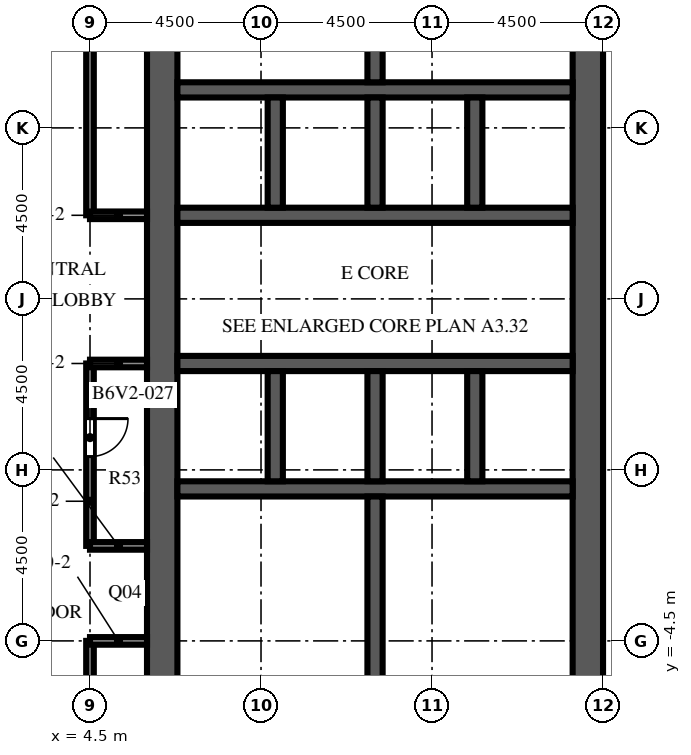
"""IFC4 building model, lengths in metres.
Left out: names, types, materials, properties, quantities, classifications, styles, units other than length and angle.
Written with IfcOpenShell. Run it as: python <this file> out.ifc"""

import sys

from ifc_helpers import new_model, si_unit, direction, frame, frame_2d, origin, place, context, subcontext, project, spatial, rectangle, extrude, element, fill, save


model = new_model("IFC4")
c1 = context("Model", 3, precision=1e-05, world=origin(), true_north=direction((0.0, 1.0)))
c2 = subcontext(c1, "Body", "Model", "MODEL_VIEW")
j1 = project(units=[si_unit("LENGTHUNIT", "METRE"), si_unit("PLANEANGLEUNIT", "RADIAN")], contexts=[c1])
p1 = place(None, origin())
s1 = spatial("IfcSite", under=j1, at=p1, CompositionType="ELEMENT")
p2 = place(p1, origin())
s2 = spatial("IfcBuilding", under=s1, at=p2, CompositionType="ELEMENT")
p3 = place(p2, frame((0.0, 0.0, 216.1)))
s3 = spatial("IfcBuildingStorey", under=s2, at=p3, CompositionType="ELEMENT", Elevation=216.1)
p4 = place(p3, frame((6.4, -9.0, 0.0), z_axis=(0.0, 0.0, 1.0), x_axis=(0.0, 1.0, 0.0)))
e1 = element("IfcWall", 1, at=p4, inside=s3, PredefinedType="SHEAR", context=c2, shape_type="SweptSolid", body=[
    extrude(rectangle(XDim=27.5, YDim=0.8, at=frame_2d((13.75, 0.0))), origin(), (0.0, 0.0, 1.0), 4.1),
])
p5 = place(p4, frame((12.55, 0.0, 0.0)))
e2 = element("IfcOpeningElement", 2, at=p5, cuts=e1, PredefinedType="OPENING", context=c2, shape_type="SweptSolid", body=[
    extrude(rectangle(XDim=2.4, YDim=2.4, at=frame_2d((1.2, 1.2))), frame((0.0, 0.41, 0.0), z_axis=(0.0, -1.0, 0.0), x_axis=(1.0, 0.0, 0.0)), (0.0, 0.0, 1.0), 0.82),
])
p6 = place(p4, frame((5.5, 0.0, 0.0)))
e3 = element("IfcOpeningElement", 3, at=p6, cuts=e1, PredefinedType="OPENING", context=c2, shape_type="SweptSolid", body=[
    extrude(rectangle(XDim=0.95, YDim=2.1, at=frame_2d((0.475, 1.05))), frame((0.0, 0.41, 0.0), z_axis=(0.0, -1.0, 0.0), x_axis=(1.0, 0.0, 0.0)), (0.0, 0.0, 1.0), 0.82),
])
p7 = place(p4, frame((23.475, 0.0, 0.0)))
e4 = element("IfcOpeningElement", 4, at=p7, cuts=e1, PredefinedType="OPENING", context=c2, shape_type="SweptSolid", body=[
    extrude(rectangle(XDim=1.2, YDim=2.1, at=frame_2d((0.6, 1.05))), frame((0.0, 0.41, 0.0), z_axis=(0.0, -1.0, 0.0), x_axis=(1.0, 0.0, 0.0)), (0.0, 0.0, 1.0), 0.82),
])
p8 = place(p3, frame((17.6, -9.0, 0.0), z_axis=(0.0, 0.0, 1.0), x_axis=(0.0, 1.0, 0.0)))
e5 = element("IfcWall", 5, at=p8, inside=s3, PredefinedType="SHEAR", context=c2, shape_type="SweptSolid", body=[
    extrude(rectangle(XDim=27.5, YDim=0.8, at=frame_2d((13.75, 0.0))), origin(), (0.0, 0.0, 1.0), 4.1),
])
p9 = place(p8, frame((12.55, 0.0, 0.0)))
e6 = element("IfcOpeningElement", 6, at=p9, cuts=e5, PredefinedType="OPENING", context=c2, shape_type="SweptSolid", body=[
    extrude(rectangle(XDim=2.4, YDim=2.4, at=frame_2d((1.2, 1.2))), frame((0.0, 0.41, 0.0), z_axis=(0.0, -1.0, 0.0), x_axis=(1.0, 0.0, 0.0)), (0.0, 0.0, 1.0), 0.82),
])
p10 = place(p8, frame((6.825, 0.0, 0.0)))
e7 = element("IfcOpeningElement", 7, at=p10, cuts=e5, PredefinedType="OPENING", context=c2, shape_type="SweptSolid", body=[
    extrude(rectangle(XDim=1.2, YDim=2.1, at=frame_2d((0.6, 1.05))), frame((0.0, 0.41, 0.0), z_axis=(0.0, -1.0, 0.0), x_axis=(1.0, 0.0, 0.0)), (0.0, 0.0, 1.0), 0.82),
])
p11 = place(p8, frame((19.475, 0.0, 0.0)))
e8 = element("IfcOpeningElement", 8, at=p11, cuts=e5, PredefinedType="OPENING", context=c2, shape_type="SweptSolid", body=[
    extrude(rectangle(XDim=1.2, YDim=2.1, at=frame_2d((0.6, 1.05))), frame((0.0, 0.41, 0.0), z_axis=(0.0, -1.0, 0.0), x_axis=(1.0, 0.0, 0.0)), (0.0, 0.0, 1.0), 0.82),
])
p12 = place(p3, frame((6.8, -0.5, 0.0), z_axis=(0.0, 0.0, 1.0), x_axis=(1.0, 0.0, 0.0)))
e9 = element("IfcWall", 9, at=p12, inside=s3, PredefinedType="SHEAR", context=c2, shape_type="SweptSolid", body=[
    extrude(rectangle(XDim=10.4, YDim=0.4, at=frame_2d((5.2, 0.0))), origin(), (0.0, 0.0, 1.0), 4.1),
])
p13 = place(p3, frame((6.8, 2.8, 0.0), z_axis=(0.0, 0.0, 1.0), x_axis=(1.0, 0.0, 0.0)))
e10 = element("IfcWall", 10, at=p13, inside=s3, PredefinedType="SHEAR", context=c2, shape_type="SweptSolid", body=[
    extrude(rectangle(XDim=10.4, YDim=0.4, at=frame_2d((5.2, 0.0))), origin(), (0.0, 0.0, 1.0), 4.1),
])
p14 = place(p13, frame((0.738, 0.0, 0.0)))
e11 = element("IfcOpeningElement", 11, at=p14, cuts=e10, PredefinedType="OPENING", context=c2, shape_type="SweptSolid", body=[
    extrude(rectangle(XDim=1.1, YDim=2.1, at=frame_2d((0.55, 1.05))), frame((0.0, 0.21, 0.0), z_axis=(0.0, -1.0, 0.0), x_axis=(1.0, 0.0, 0.0)), (0.0, 0.0, 1.0), 0.42),
])
p15 = place(p13, frame((3.337, 0.0, 0.0)))
e12 = element("IfcOpeningElement", 12, at=p15, cuts=e10, PredefinedType="OPENING", context=c2, shape_type="SweptSolid", body=[
    extrude(rectangle(XDim=1.1, YDim=2.1, at=frame_2d((0.55, 1.05))), frame((0.0, 0.21, 0.0), z_axis=(0.0, -1.0, 0.0), x_axis=(1.0, 0.0, 0.0)), (0.0, 0.0, 1.0), 0.42),
])
p16 = place(p13, frame((6.012, 0.0, 0.0)))
e13 = element("IfcOpeningElement", 13, at=p16, cuts=e10, PredefinedType="OPENING", context=c2, shape_type="SweptSolid", body=[
    extrude(rectangle(XDim=1.0, YDim=2.1, at=frame_2d((0.5, 1.05))), frame((0.0, 0.21, 0.0), z_axis=(0.0, -1.0, 0.0), x_axis=(1.0, 0.0, 0.0)), (0.0, 0.0, 1.0), 0.42),
])
p17 = place(p13, frame((8.613, 0.0, 0.0)))
e14 = element("IfcOpeningElement", 14, at=p17, cuts=e10, PredefinedType="OPENING", context=c2, shape_type="SweptSolid", body=[
    extrude(rectangle(XDim=1.0, YDim=2.1, at=frame_2d((0.5, 1.05))), frame((0.0, 0.21, 0.0), z_axis=(0.0, -1.0, 0.0), x_axis=(1.0, 0.0, 0.0)), (0.0, 0.0, 1.0), 0.42),
])
p18 = place(p3, frame((6.8, 6.7, 0.0), z_axis=(0.0, 0.0, 1.0), x_axis=(1.0, 0.0, 0.0)))
e15 = element("IfcWall", 15, at=p18, inside=s3, PredefinedType="SHEAR", context=c2, shape_type="SweptSolid", body=[
    extrude(rectangle(XDim=10.4, YDim=0.4, at=frame_2d((5.2, 0.0))), origin(), (0.0, 0.0, 1.0), 4.1),
])
p19 = place(p18, frame((3.337, 0.0, 0.0)))
e16 = element("IfcOpeningElement", 16, at=p19, cuts=e15, PredefinedType="OPENING", context=c2, shape_type="SweptSolid", body=[
    extrude(rectangle(XDim=1.1, YDim=2.1, at=frame_2d((0.55, 1.05))), frame((0.0, 0.21, 0.0), z_axis=(0.0, -1.0, 0.0), x_axis=(1.0, 0.0, 0.0)), (0.0, 0.0, 1.0), 0.42),
])
p20 = place(p18, frame((5.962, 0.0, 0.0)))
e17 = element("IfcOpeningElement", 17, at=p20, cuts=e15, PredefinedType="OPENING", context=c2, shape_type="SweptSolid", body=[
    extrude(rectangle(XDim=1.1, YDim=2.1, at=frame_2d((0.55, 1.05))), frame((0.0, 0.21, 0.0), z_axis=(0.0, -1.0, 0.0), x_axis=(1.0, 0.0, 0.0)), (0.0, 0.0, 1.0), 0.42),
])
p21 = place(p18, frame((8.663, 0.0, 0.0)))
e18 = element("IfcOpeningElement", 18, at=p21, cuts=e15, PredefinedType="OPENING", context=c2, shape_type="SweptSolid", body=[
    extrude(rectangle(XDim=1.1, YDim=2.1, at=frame_2d((0.55, 1.05))), frame((0.0, 0.21, 0.0), z_axis=(0.0, -1.0, 0.0), x_axis=(1.0, 0.0, 0.0)), (0.0, 0.0, 1.0), 0.42),
])
p22 = place(p18, frame((0.688, 0.0, 0.0)))
e19 = element("IfcOpeningElement", 19, at=p22, cuts=e15, PredefinedType="OPENING", context=c2, shape_type="SweptSolid", body=[
    extrude(rectangle(XDim=1.0, YDim=2.1, at=frame_2d((0.5, 1.05))), frame((0.0, 0.21, 0.0), z_axis=(0.0, -1.0, 0.0), x_axis=(1.0, 0.0, 0.0)), (0.0, 0.0, 1.0), 0.42),
])
p23 = place(p3, frame((6.8, 10.0, 0.0), z_axis=(0.0, 0.0, 1.0), x_axis=(1.0, 0.0, 0.0)))
e20 = element("IfcWall", 20, at=p23, inside=s3, PredefinedType="SHEAR", context=c2, shape_type="SweptSolid", body=[
    extrude(rectangle(XDim=10.4, YDim=0.4, at=frame_2d((5.2, 0.0))), origin(), (0.0, 0.0, 1.0), 4.1),
])
for number, where, z_axis, x_axis in (
    (21, (9.375, -0.3, 0.0), (0.0, 0.0, 1.0), (0.0, 1.0, 0.0)),
    (22, (9.375, 6.9, 0.0), (0.0, 0.0, 1.0), (0.0, 1.0, 0.0)),
    (23, (12.0, -0.3, 0.0), (0.0, 0.0, 1.0), (0.0, 1.0, 0.0)),
    (24, (12.0, 6.9, 0.0), (0.0, 0.0, 1.0), (0.0, 1.0, 0.0)),
    (25, (14.625, -0.3, 0.0), (0.0, 0.0, 1.0), (0.0, 1.0, 0.0)),
    (26, (14.625, 6.9, 0.0), (0.0, 0.0, 1.0), (0.0, 1.0, 0.0)),
):
    element("IfcWall", number, at=place(p3, frame(where, z_axis=z_axis, x_axis=x_axis)), inside=s3, PredefinedType="SHEAR", context=c2, shape_type="SweptSolid", body=[
        extrude(rectangle(XDim=2.9, YDim=0.4, at=frame_2d((1.45, 0.0))), origin(), (0.0, 0.0, 1.0), 4.1),
    ])
for number, where, z_axis, x_axis in (
    (27, (12.0, -8.2, 0.0), (0.0, 0.0, 1.0), (0.0, 1.0, 0.0)),
    (28, (12.0, 10.2, 0.0), (0.0, 0.0, 1.0), (0.0, 1.0, 0.0)),
):
    element("IfcWall", number, at=place(p3, frame(where, z_axis=z_axis, x_axis=x_axis)), inside=s3, PredefinedType="SHEAR", context=c2, shape_type="SweptSolid", body=[
        extrude(rectangle(XDim=7.5, YDim=0.4, at=frame_2d((3.75, 0.0))), origin(), (0.0, 0.0, 1.0), 4.1),
    ])
p24 = place(p3, frame((6.8, -3.7, 0.0), z_axis=(0.0, 0.0, 1.0), x_axis=(1.0, 0.0, 0.0)))
e29 = element("IfcWall", 29, at=p24, inside=s3, PredefinedType="PARTITIONING", context=c2, shape_type="SweptSolid", body=[
    extrude(rectangle(XDim=2.5, YDim=0.1, at=frame_2d((1.25, 0.0))), origin(), (0.0, 0.0, 1.0), 3.5),
])
p25 = place(p24, frame((0.75, 0.0, 0.0)))
e30 = element("IfcOpeningElement", 30, at=p25, cuts=e29, PredefinedType="OPENING", context=c2, shape_type="SweptSolid", body=[
    extrude(rectangle(XDim=1.0, YDim=2.1, at=frame_2d((0.5, 1.05))), frame((0.0, 0.06, 0.0), z_axis=(0.0, -1.0, 0.0), x_axis=(1.0, 0.0, 0.0)), (0.0, 0.0, 1.0), 0.12),
])
p26 = place(p3, frame((9.3, -3.7, 0.0), z_axis=(0.0, 0.0, 1.0), x_axis=(1.0, 0.0, 0.0)))
e31 = element("IfcWall", 31, at=p26, inside=s3, PredefinedType="PARTITIONING", context=c2, shape_type="SweptSolid", body=[
    extrude(rectangle(XDim=2.5, YDim=0.1, at=frame_2d((1.25, 0.0))), origin(), (0.0, 0.0, 1.0), 3.5),
])
p27 = place(p26, frame((0.75, 0.0, 0.0)))
e32 = element("IfcOpeningElement", 32, at=p27, cuts=e31, PredefinedType="OPENING", context=c2, shape_type="SweptSolid", body=[
    extrude(rectangle(XDim=1.0, YDim=2.1, at=frame_2d((0.5, 1.05))), frame((0.0, 0.06, 0.0), z_axis=(0.0, -1.0, 0.0), x_axis=(1.0, 0.0, 0.0)), (0.0, 0.0, 1.0), 0.12),
])
p28 = place(p3, frame((6.8, -2.35, 0.0), z_axis=(0.0, 0.0, 1.0), x_axis=(1.0, 0.0, 0.0)))
e33 = element("IfcWall", 33, at=p28, inside=s3, PredefinedType="PARTITIONING", context=c2, shape_type="SweptSolid", body=[
    extrude(rectangle(XDim=2.5, YDim=0.1, at=frame_2d((1.25, 0.0))), origin(), (0.0, 0.0, 1.0), 3.5),
])
p29 = place(p28, frame((0.75, 0.0, 0.0)))
e34 = element("IfcOpeningElement", 34, at=p29, cuts=e33, PredefinedType="OPENING", context=c2, shape_type="SweptSolid", body=[
    extrude(rectangle(XDim=1.0, YDim=2.1, at=frame_2d((0.5, 1.05))), frame((0.0, 0.06, 0.0), z_axis=(0.0, -1.0, 0.0), x_axis=(1.0, 0.0, 0.0)), (0.0, 0.0, 1.0), 0.12),
])
p30 = place(p3, frame((9.3, -2.35, 0.0), z_axis=(0.0, 0.0, 1.0), x_axis=(1.0, 0.0, 0.0)))
e35 = element("IfcWall", 35, at=p30, inside=s3, PredefinedType="PARTITIONING", context=c2, shape_type="SweptSolid", body=[
    extrude(rectangle(XDim=2.5, YDim=0.1, at=frame_2d((1.25, 0.0))), origin(), (0.0, 0.0, 1.0), 3.5),
])
p31 = place(p30, frame((0.75, 0.0, 0.0)))
e36 = element("IfcOpeningElement", 36, at=p31, cuts=e35, PredefinedType="OPENING", context=c2, shape_type="SweptSolid", body=[
    extrude(rectangle(XDim=1.0, YDim=2.1, at=frame_2d((0.5, 1.05))), frame((0.0, 0.06, 0.0), z_axis=(0.0, -1.0, 0.0), x_axis=(1.0, 0.0, 0.0)), (0.0, 0.0, 1.0), 0.12),
])
p32 = place(p3, frame((9.3, -8.2, 0.0), z_axis=(0.0, 0.0, 1.0), x_axis=(0.0, 1.0, 0.0)))
e37 = element("IfcWall", 37, at=p32, inside=s3, PredefinedType="PARTITIONING", context=c2, shape_type="SweptSolid", body=[
    extrude(rectangle(XDim=4.5, YDim=0.1, at=frame_2d((2.25, 0.0))), origin(), (0.0, 0.0, 1.0), 3.5),
])
p33 = place(p3, frame((9.3, -2.35, 0.0), z_axis=(0.0, 0.0, 1.0), x_axis=(0.0, 1.0, 0.0)))
e38 = element("IfcWall", 38, at=p33, inside=s3, PredefinedType="PARTITIONING", context=c2, shape_type="SweptSolid", body=[
    extrude(rectangle(XDim=1.65, YDim=0.1, at=frame_2d((0.825, 0.0))), origin(), (0.0, 0.0, 1.0), 3.5),
])
p34 = place(p3, frame((4.5, -4.5, 0.0), z_axis=(0.0, 0.0, 1.0), x_axis=(0.0, -1.0, 0.0)))
e39 = element("IfcWall", 39, at=p34, inside=s3, PredefinedType="PARTITIONING", context=c2, shape_type="SweptSolid", body=[
    extrude(rectangle(XDim=22.0, YDim=0.2, at=frame_2d((11.0, 0.0))), origin(), (0.0, 0.0, 1.0), 3.5),
])
p35 = place(p34, frame((1.4, 0.0, 0.0)))
e40 = element("IfcOpeningElement", 40, at=p35, cuts=e39, PredefinedType="OPENING", context=c2, shape_type="SweptSolid", body=[
    extrude(rectangle(XDim=1.0, YDim=2.1, at=frame_2d((0.5, 1.05))), frame((0.0, 0.11, 0.0), z_axis=(0.0, -1.0, 0.0), x_axis=(1.0, 0.0, 0.0)), (0.0, 0.0, 1.0), 0.22),
])
p36 = place(p3, frame((4.5, 2.8, 0.0), z_axis=(0.0, 0.0, 1.0), x_axis=(0.0, -1.0, 0.0)))
e41 = element("IfcWall", 41, at=p36, inside=s3, PredefinedType="PARTITIONING", context=c2, shape_type="SweptSolid", body=[
    extrude(rectangle(XDim=4.8, YDim=0.2, at=frame_2d((2.4, 0.0))), origin(), (0.0, 0.0, 1.0), 3.5),
])
p37 = place(p36, frame((1.45, 0.0, 0.0)))
e42 = element("IfcOpeningElement", 42, at=p37, cuts=e41, PredefinedType="OPENING", context=c2, shape_type="SweptSolid", body=[
    extrude(rectangle(XDim=1.0, YDim=2.1, at=frame_2d((0.5, 1.05))), frame((0.0, 0.11, 0.0), z_axis=(0.0, -1.0, 0.0), x_axis=(1.0, 0.0, 0.0)), (0.0, 0.0, 1.0), 0.22),
])
p38 = place(p3, frame((4.5, 26.5, 0.0), z_axis=(0.0, 0.0, 1.0), x_axis=(0.0, -1.0, 0.0)))
e43 = element("IfcWall", 43, at=p38, inside=s3, PredefinedType="PARTITIONING", context=c2, shape_type="SweptSolid", body=[
    extrude(rectangle(XDim=19.8, YDim=0.2, at=frame_2d((9.9, 0.0))), origin(), (0.0, 0.0, 1.0), 3.5),
])
p39 = place(p38, frame((13.45, 0.0, 0.0)))
e44 = element("IfcOpeningElement", 44, at=p39, cuts=e43, PredefinedType="OPENING", context=c2, shape_type="SweptSolid", body=[
    extrude(rectangle(XDim=1.0, YDim=2.1, at=frame_2d((0.5, 1.05))), frame((0.0, 0.11, 0.0), z_axis=(0.0, -1.0, 0.0), x_axis=(1.0, 0.0, 0.0)), (0.0, 0.0, 1.0), 0.22),
])
for number, where, z_axis, x_axis in (
    (45, (4.5, -4.5, 0.0), (0.0, 0.0, 1.0), (1.0, 0.0, 0.0)),
    (46, (4.5, -2.0, 0.0), (0.0, 0.0, 1.0), (1.0, 0.0, 0.0)),
    (47, (4.5, 2.8, 0.0), (0.0, 0.0, 1.0), (1.0, 0.0, 0.0)),
    (48, (4.5, 6.7, 0.0), (0.0, 0.0, 1.0), (1.0, 0.0, 0.0)),
):
    element("IfcWall", number, at=place(p3, frame(where, z_axis=z_axis, x_axis=x_axis)), inside=s3, PredefinedType="PARTITIONING", context=c2, shape_type="SweptSolid", body=[
        extrude(rectangle(XDim=1.5, YDim=0.2, at=frame_2d((0.75, 0.0))), origin(), (0.0, 0.0, 1.0), 3.5),
    ])
p40 = place(p14, origin())
e49 = element("IfcDoor", 49, at=p40, inside=s3, OperationType="DOUBLE_DOOR_SLIDING", PredefinedType="DOOR", context=c2, shape_type="SweptSolid", body=[
    extrude(rectangle(XDim=1.1, YDim=2.1, at=frame_2d((0.55, 1.05))), frame((0.0, 0.025, 0.0), z_axis=(0.0, -1.0, 0.0), x_axis=(1.0, 0.0, 0.0)), (0.0, 0.0, 1.0), 0.05),
])
fill(e11, e49)
p41 = place(p15, origin())
e50 = element("IfcDoor", 50, at=p41, inside=s3, OperationType="DOUBLE_DOOR_SLIDING", PredefinedType="DOOR", context=c2, shape_type="SweptSolid", body=[
    extrude(rectangle(XDim=1.1, YDim=2.1, at=frame_2d((0.55, 1.05))), frame((0.0, 0.025, 0.0), z_axis=(0.0, -1.0, 0.0), x_axis=(1.0, 0.0, 0.0)), (0.0, 0.0, 1.0), 0.05),
])
fill(e12, e50)
p42 = place(p19, origin())
e51 = element("IfcDoor", 51, at=p42, inside=s3, OperationType="DOUBLE_DOOR_SLIDING", PredefinedType="DOOR", context=c2, shape_type="SweptSolid", body=[
    extrude(rectangle(XDim=1.1, YDim=2.1, at=frame_2d((0.55, 1.05))), frame((0.0, 0.025, 0.0), z_axis=(0.0, -1.0, 0.0), x_axis=(1.0, 0.0, 0.0)), (0.0, 0.0, 1.0), 0.05),
])
fill(e16, e51)
p43 = place(p20, origin())
e52 = element("IfcDoor", 52, at=p43, inside=s3, OperationType="DOUBLE_DOOR_SLIDING", PredefinedType="DOOR", context=c2, shape_type="SweptSolid", body=[
    extrude(rectangle(XDim=1.1, YDim=2.1, at=frame_2d((0.55, 1.05))), frame((0.0, 0.025, 0.0), z_axis=(0.0, -1.0, 0.0), x_axis=(1.0, 0.0, 0.0)), (0.0, 0.0, 1.0), 0.05),
])
fill(e17, e52)
p44 = place(p21, origin())
e53 = element("IfcDoor", 53, at=p44, inside=s3, OperationType="DOUBLE_DOOR_SLIDING", PredefinedType="DOOR", context=c2, shape_type="SweptSolid", body=[
    extrude(rectangle(XDim=1.1, YDim=2.1, at=frame_2d((0.55, 1.05))), frame((0.0, 0.025, 0.0), z_axis=(0.0, -1.0, 0.0), x_axis=(1.0, 0.0, 0.0)), (0.0, 0.0, 1.0), 0.05),
])
fill(e18, e53)
p45 = place(p5, origin())
e54 = element("IfcDoor", 54, at=p45, inside=s3, OperationType="DOUBLE_DOOR_DOUBLE_SWING", PredefinedType="DOOR", context=c2, shape_type="SweptSolid", body=[
    extrude(rectangle(XDim=2.4, YDim=2.4, at=frame_2d((1.2, 1.2))), frame((0.0, 0.025, 0.0), z_axis=(0.0, -1.0, 0.0), x_axis=(1.0, 0.0, 0.0)), (0.0, 0.0, 1.0), 0.05),
])
fill(e2, e54)
p46 = place(p9, origin())
e55 = element("IfcDoor", 55, at=p46, inside=s3, OperationType="DOUBLE_DOOR_DOUBLE_SWING", PredefinedType="DOOR", context=c2, shape_type="SweptSolid", body=[
    extrude(rectangle(XDim=2.4, YDim=2.4, at=frame_2d((1.2, 1.2))), frame((0.0, 0.025, 0.0), z_axis=(0.0, -1.0, 0.0), x_axis=(1.0, 0.0, 0.0)), (0.0, 0.0, 1.0), 0.05),
])
fill(e6, e55)
p47 = place(p10, frame((1.2, 0.0, 0.0), z_axis=(0.0, 0.0, 1.0), x_axis=(-1.0, 0.0, 0.0)))
e56 = element("IfcDoor", 56, at=p47, inside=s3, OperationType="SINGLE_SWING_LEFT", PredefinedType="DOOR", context=c2, shape_type="SweptSolid", body=[
    extrude(rectangle(XDim=1.2, YDim=2.1, at=frame_2d((0.6, 1.05))), frame((0.0, 0.025, 0.0), z_axis=(0.0, -1.0, 0.0), x_axis=(1.0, 0.0, 0.0)), (0.0, 0.0, 1.0), 0.05),
])
fill(e7, e56)
p48 = place(p11, frame((1.2, 0.0, 0.0), z_axis=(0.0, 0.0, 1.0), x_axis=(-1.0, 0.0, 0.0)))
e57 = element("IfcDoor", 57, at=p48, inside=s3, OperationType="SINGLE_SWING_LEFT", PredefinedType="DOOR", context=c2, shape_type="SweptSolid", body=[
    extrude(rectangle(XDim=1.2, YDim=2.1, at=frame_2d((0.6, 1.05))), frame((0.0, 0.025, 0.0), z_axis=(0.0, -1.0, 0.0), x_axis=(1.0, 0.0, 0.0)), (0.0, 0.0, 1.0), 0.05),
])
fill(e8, e57)
p49 = place(p16, origin())
e58 = element("IfcDoor", 58, at=p49, inside=s3, OperationType="SINGLE_SWING_LEFT", PredefinedType="DOOR", context=c2, shape_type="SweptSolid", body=[
    extrude(rectangle(XDim=1.0, YDim=2.1, at=frame_2d((0.5, 1.05))), frame((0.0, 0.025, 0.0), z_axis=(0.0, -1.0, 0.0), x_axis=(1.0, 0.0, 0.0)), (0.0, 0.0, 1.0), 0.05),
])
fill(e13, e58)
p50 = place(p17, origin())
e59 = element("IfcDoor", 59, at=p50, inside=s3, OperationType="SINGLE_SWING_RIGHT", PredefinedType="DOOR", context=c2, shape_type="SweptSolid", body=[
    extrude(rectangle(XDim=1.0, YDim=2.1, at=frame_2d((0.5, 1.05))), frame((0.0, 0.025, 0.0), z_axis=(0.0, -1.0, 0.0), x_axis=(1.0, 0.0, 0.0)), (0.0, 0.0, 1.0), 0.05),
])
fill(e14, e59)
p51 = place(p22, origin())
e60 = element("IfcDoor", 60, at=p51, inside=s3, OperationType="SINGLE_SWING_LEFT", PredefinedType="DOOR", context=c2, shape_type="SweptSolid", body=[
    extrude(rectangle(XDim=1.0, YDim=2.1, at=frame_2d((0.5, 1.05))), frame((0.0, 0.025, 0.0), z_axis=(0.0, -1.0, 0.0), x_axis=(1.0, 0.0, 0.0)), (0.0, 0.0, 1.0), 0.05),
])
fill(e19, e60)
p52 = place(p6, origin())
e61 = element("IfcDoor", 61, at=p52, inside=s3, OperationType="SINGLE_SWING_RIGHT", PredefinedType="DOOR", context=c2, shape_type="SweptSolid", body=[
    extrude(rectangle(XDim=0.95, YDim=2.1, at=frame_2d((0.475, 1.05))), frame((0.0, -0.325, 0.0), z_axis=(0.0, -1.0, 0.0), x_axis=(1.0, 0.0, 0.0)), (0.0, 0.0, 1.0), 0.05),
])
fill(e3, e61)
p53 = place(p25, origin())
e62 = element("IfcDoor", 62, at=p53, inside=s3, OperationType="SINGLE_SWING_LEFT", PredefinedType="DOOR", context=c2, shape_type="SweptSolid", body=[
    extrude(rectangle(XDim=1.0, YDim=2.1, at=frame_2d((0.5, 1.05))), frame((0.0, 0.025, 0.0), z_axis=(0.0, -1.0, 0.0), x_axis=(1.0, 0.0, 0.0)), (0.0, 0.0, 1.0), 0.05),
])
fill(e30, e62)
p54 = place(p27, origin())
e63 = element("IfcDoor", 63, at=p54, inside=s3, OperationType="SINGLE_SWING_RIGHT", PredefinedType="DOOR", context=c2, shape_type="SweptSolid", body=[
    extrude(rectangle(XDim=1.0, YDim=2.1, at=frame_2d((0.5, 1.05))), frame((0.0, 0.025, 0.0), z_axis=(0.0, -1.0, 0.0), x_axis=(1.0, 0.0, 0.0)), (0.0, 0.0, 1.0), 0.05),
])
fill(e32, e63)
p55 = place(p29, origin())
e64 = element("IfcDoor", 64, at=p55, inside=s3, OperationType="SINGLE_SWING_LEFT", PredefinedType="DOOR", context=c2, shape_type="SweptSolid", body=[
    extrude(rectangle(XDim=1.0, YDim=2.1, at=frame_2d((0.5, 1.05))), frame((0.0, 0.025, 0.0), z_axis=(0.0, -1.0, 0.0), x_axis=(1.0, 0.0, 0.0)), (0.0, 0.0, 1.0), 0.05),
])
fill(e34, e64)
p56 = place(p31, origin())
e65 = element("IfcDoor", 65, at=p56, inside=s3, OperationType="SINGLE_SWING_RIGHT", PredefinedType="DOOR", context=c2, shape_type="SweptSolid", body=[
    extrude(rectangle(XDim=1.0, YDim=2.1, at=frame_2d((0.5, 1.05))), frame((0.0, 0.025, 0.0), z_axis=(0.0, -1.0, 0.0), x_axis=(1.0, 0.0, 0.0)), (0.0, 0.0, 1.0), 0.05),
])
fill(e36, e65)
p57 = place(p37, origin())
e66 = element("IfcDoor", 66, at=p57, inside=s3, OperationType="SINGLE_SWING_LEFT", PredefinedType="DOOR", context=c2, shape_type="SweptSolid", body=[
    extrude(rectangle(XDim=1.0, YDim=2.1, at=frame_2d((0.5, 1.05))), frame((0.0, 0.025, 0.0), z_axis=(0.0, -1.0, 0.0), x_axis=(1.0, 0.0, 0.0)), (0.0, 0.0, 1.0), 0.05),
])
fill(e42, e66)
save(model, sys.argv[1])
